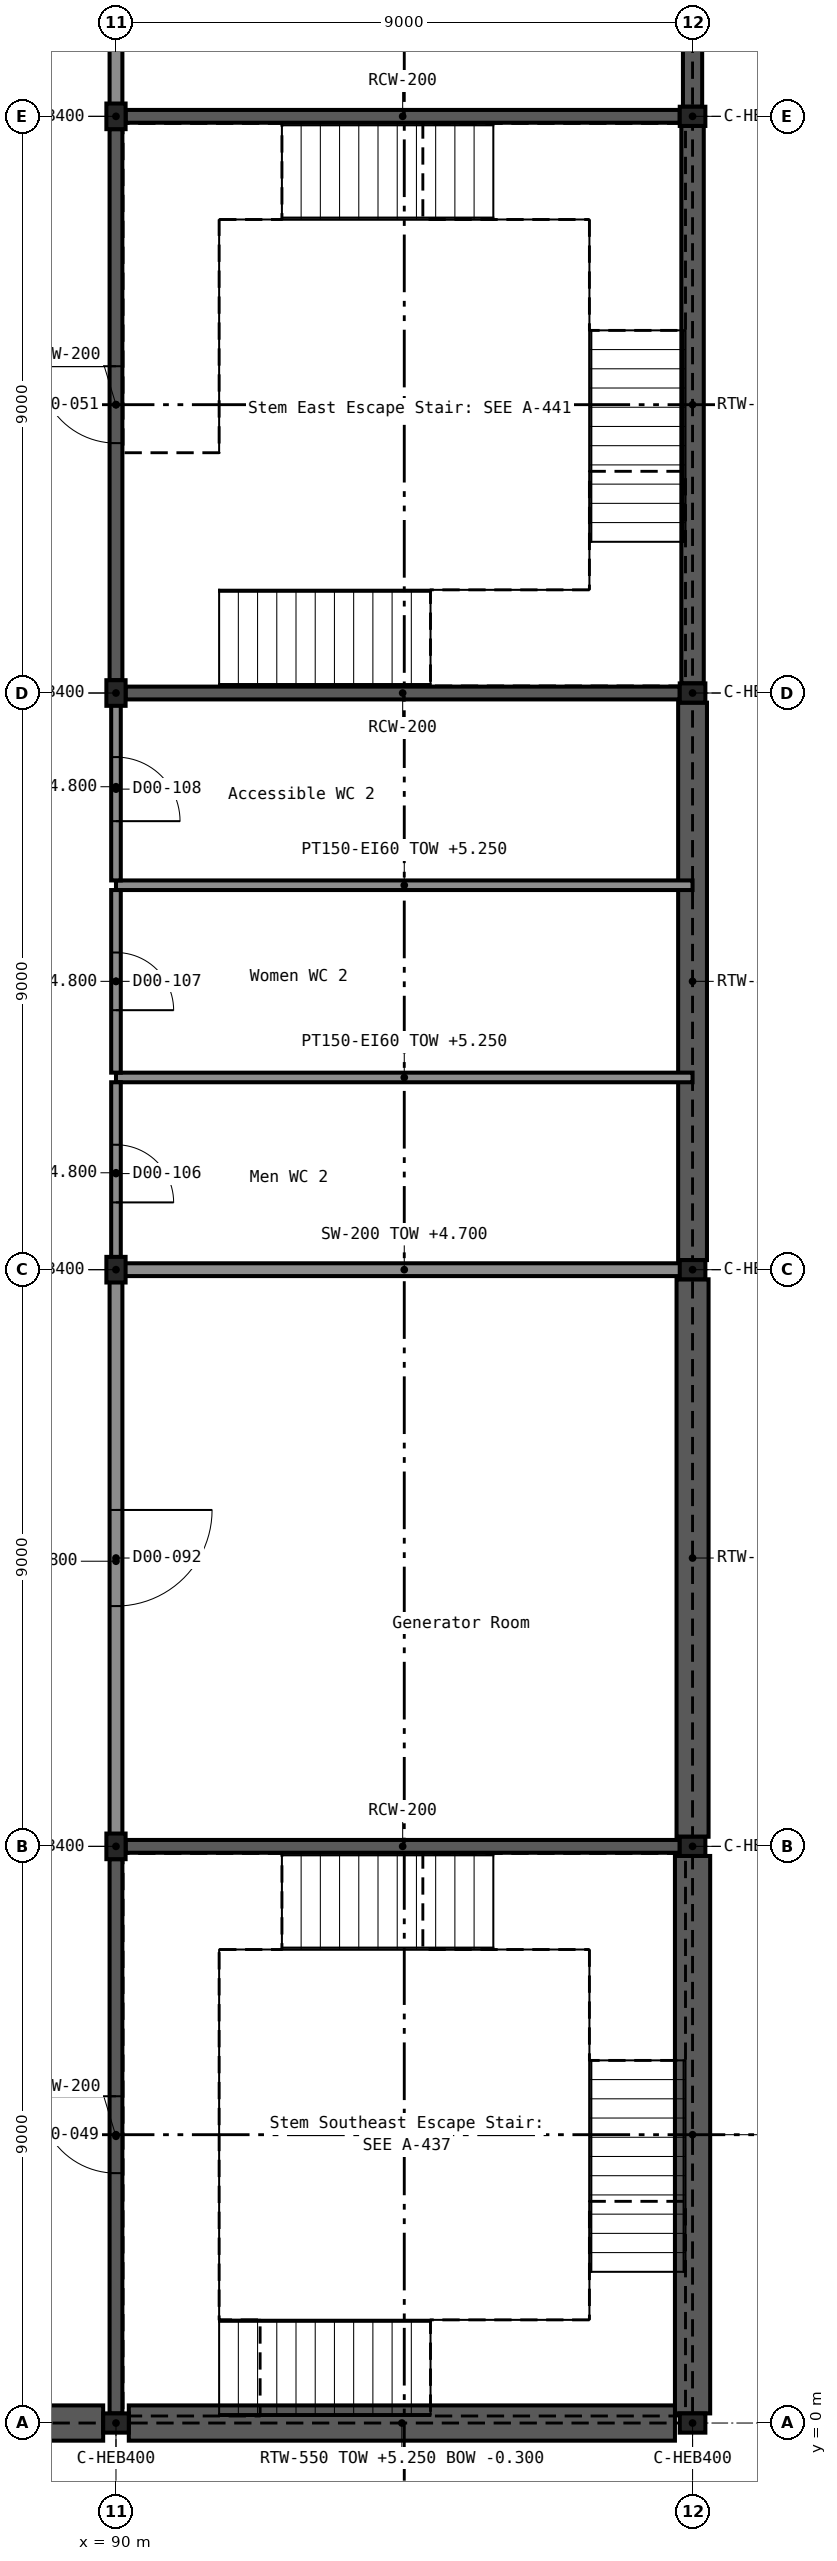
"""IFC4 building model, lengths in metres.
Left out: names, types, materials, properties, quantities, classifications, styles, units other than length and angle.
Written with IfcOpenShell. Run it as: python <this file> out.ifc"""

import sys

from ifc_helpers import new_model, si_unit, direction, frame, frame_2d, origin, origin_2d, place, context, subcontext, project, spatial, rectangle, i_section, extrude, element, fill, save


model = new_model("IFC4")
c1 = context("Model", 3, precision=1e-05, world=origin(), true_north=direction((0.0, 1.0)))
c2 = subcontext(c1, "Body", "Model", "MODEL_VIEW")
j1 = project(units=[si_unit("LENGTHUNIT", "METRE"), si_unit("PLANEANGLEUNIT", "RADIAN")], contexts=[c1])
p1 = place(None, origin())
s1 = spatial("IfcSite", under=j1, at=p1, CompositionType="ELEMENT")
p2 = place(p1, origin())
s2 = spatial("IfcBuilding", under=s1, at=p2, CompositionType="ELEMENT")
p3 = place(p2, origin())
s3 = spatial("IfcBuildingStorey", under=s2, at=p3, CompositionType="ELEMENT", Elevation=0.0)
for number, where, z_axis, x_axis in (
    (1, (90.0, 0.0, -0.3), (0.0, 0.0, 1.0), (0.0, 1.0, 0.0)),
    (2, (99.0, 0.0, -0.3), (0.0, 0.0, 1.0), (0.0, 1.0, 0.0)),
    (3, (90.0, 9.0, -0.3), (0.0, 0.0, 1.0), (1.0, 0.0, 0.0)),
    (4, (99.0, 9.0, -0.3), (0.0, 0.0, 1.0), (0.0, 1.0, 0.0)),
    (5, (90.0, 18.0, -0.3), (0.0, 0.0, 1.0), (1.0, 0.0, 0.0)),
    (6, (99.0, 18.0, -0.3), (0.0, 0.0, 1.0), (0.0, 1.0, 0.0)),
    (7, (90.0, 27.0, -0.3), (0.0, 0.0, 1.0), (1.0, 0.0, 0.0)),
    (8, (99.0, 27.0, -0.3), (0.0, 0.0, 1.0), (0.0, 1.0, 0.0)),
    (9, (90.0, 36.0, -0.3), (0.0, 0.0, 1.0), (1.0, 0.0, 0.0)),
    (10, (99.0, 36.0, -0.3), (0.0, 0.0, 1.0), (0.0, 1.0, 0.0)),
):
    element("IfcColumn", number, at=place(p3, frame(where, z_axis=z_axis, x_axis=x_axis)), inside=s3, PredefinedType="COLUMN", context=c2, shape_type="SweptSolid", body=[
        extrude(i_section(OverallWidth=0.3, OverallDepth=0.4, WebThickness=0.013, FlangeThickness=0.024, FilletRadius=0.027, at=origin_2d()), origin(), (0.0, 0.0, 1.0), 5.7),
    ])
p4 = place(p3, frame((99.0, 0.15, -0.3), z_axis=(0.0, 0.0, 1.0), x_axis=(0.0, 1.0, 0.0)))
e11 = element("IfcWall", 11, at=p4, inside=s3, PredefinedType="SOLIDWALL", context=c2, shape_type="SweptSolid", body=[
    extrude(rectangle(XDim=8.7, YDim=0.55, at=frame_2d((4.35, 0.0))), origin(), (0.0, 0.0, 1.0), 5.55),
])
p5 = place(p3, frame((99.0, 9.15, -0.3), z_axis=(0.0, 0.0, 1.0), x_axis=(0.0, 1.0, 0.0)))
e12 = element("IfcWall", 12, at=p5, inside=s3, PredefinedType="SOLIDWALL", context=c2, shape_type="SweptSolid", body=[
    extrude(rectangle(XDim=8.7, YDim=0.5, at=frame_2d((4.35, 0.0))), origin(), (0.0, 0.0, 1.0), 5.55),
])
p6 = place(p3, frame((99.0, 18.15, -0.3), z_axis=(0.0, 0.0, 1.0), x_axis=(0.0, 1.0, 0.0)))
e13 = element("IfcWall", 13, at=p6, inside=s3, PredefinedType="SOLIDWALL", context=c2, shape_type="SweptSolid", body=[
    extrude(rectangle(XDim=8.7, YDim=0.45, at=frame_2d((4.35, 0.0))), origin(), (0.0, 0.0, 1.0), 5.55),
])
p7 = place(p3, frame((99.0, 27.15, -0.3), z_axis=(0.0, 0.0, 1.0), x_axis=(0.0, 1.0, 0.0)))
e14 = element("IfcWall", 14, at=p7, inside=s3, PredefinedType="SOLIDWALL", context=c2, shape_type="SweptSolid", body=[
    extrude(rectangle(XDim=8.7, YDim=0.35, at=frame_2d((4.35, 0.0))), origin(), (0.0, 0.0, 1.0), 5.55),
])
p8 = place(p3, frame((99.0, 36.15, -0.3), z_axis=(0.0, 0.0, 1.0), x_axis=(0.0, 1.0, 0.0)))
e15 = element("IfcWall", 15, at=p8, inside=s3, PredefinedType="SOLIDWALL", context=c2, shape_type="SweptSolid", body=[
    extrude(rectangle(XDim=8.7, YDim=0.3, at=frame_2d((4.35, 0.0))), origin(), (0.0, 0.0, 1.0), 5.55),
])
p9 = place(p3, frame((81.2, 0.0, -0.3), z_axis=(0.0, 0.0, 1.0), x_axis=(1.0, 0.0, 0.0)))
e16 = element("IfcWall", 16, at=p9, inside=s3, PredefinedType="SOLIDWALL", context=c2, shape_type="SweptSolid", body=[
    extrude(rectangle(XDim=8.6, YDim=0.55, at=frame_2d((4.3, 0.0))), origin(), (0.0, 0.0, 1.0), 5.55),
])
p10 = place(p3, frame((90.2, 0.0, -0.3), z_axis=(0.0, 0.0, 1.0), x_axis=(1.0, 0.0, 0.0)))
e17 = element("IfcWall", 17, at=p10, inside=s3, PredefinedType="SOLIDWALL", context=c2, shape_type="SweptSolid", body=[
    extrude(rectangle(XDim=8.525, YDim=0.55, at=frame_2d((4.263, 0.0))), origin(), (0.0, 0.0, 1.0), 5.55),
])
p11 = place(p3, frame((90.15, 9.0, 0.0), z_axis=(0.0, 0.0, 1.0), x_axis=(1.0, 0.0, 0.0)))
e18 = element("IfcWall", 18, at=p11, inside=s3, PredefinedType="SHEAR", context=c2, shape_type="SweptSolid", body=[
    extrude(rectangle(XDim=8.65, YDim=0.2, at=frame_2d((4.325, 0.0))), origin(), (0.0, 0.0, 1.0), 5.4),
])
p12 = place(p3, frame((90.0, 0.15, 0.0), z_axis=(0.0, 0.0, 1.0), x_axis=(0.0, 1.0, 0.0)))
e19 = element("IfcWall", 19, at=p12, inside=s3, PredefinedType="SHEAR", context=c2, shape_type="SweptSolid", body=[
    extrude(rectangle(XDim=8.65, YDim=0.2, at=frame_2d((4.325, 0.0))), origin(), (0.0, 0.0, 1.0), 5.4),
])
p13 = place(p12, frame((3.75, 0.0, 0.0)))
e20 = element("IfcOpeningElement", 20, at=p13, cuts=e19, PredefinedType="OPENING", context=c2, shape_type="SweptSolid", body=[
    extrude(rectangle(XDim=1.2, YDim=2.1, at=frame_2d((0.6, 1.05))), frame((0.0, 0.111, 0.0), z_axis=(0.0, -1.0, 0.0), x_axis=(1.0, 0.0, 0.0)), (0.0, 0.0, 1.0), 0.222),
])
for number, where, z_axis, x_axis in (
    (21, (90.15, 27.0, 0.0), (0.0, 0.0, 1.0), (1.0, 0.0, 0.0)),
    (22, (90.15, 36.0, 0.0), (0.0, 0.0, 1.0), (1.0, 0.0, 0.0)),
):
    element("IfcWall", number, at=place(p3, frame(where, z_axis=z_axis, x_axis=x_axis)), inside=s3, PredefinedType="SHEAR", context=c2, shape_type="SweptSolid", body=[
        extrude(rectangle(XDim=8.65, YDim=0.2, at=frame_2d((4.325, 0.0))), origin(), (0.0, 0.0, 1.0), 5.4),
    ])
p14 = place(p3, frame((90.0, 27.2, 0.0), z_axis=(0.0, 0.0, 1.0), x_axis=(0.0, 1.0, 0.0)))
e23 = element("IfcWall", 23, at=p14, inside=s3, PredefinedType="SHEAR", context=c2, shape_type="SweptSolid", body=[
    extrude(rectangle(XDim=8.6, YDim=0.2, at=frame_2d((4.3, 0.0))), origin(), (0.0, 0.0, 1.0), 5.4),
])
p15 = place(p14, frame((3.7, 0.0, 0.0)))
e24 = element("IfcOpeningElement", 24, at=p15, cuts=e23, PredefinedType="OPENING", context=c2, shape_type="SweptSolid", body=[
    extrude(rectangle(XDim=1.2, YDim=2.1, at=frame_2d((0.6, 1.05))), frame((0.0, 0.111, 0.0), z_axis=(0.0, -1.0, 0.0), x_axis=(1.0, 0.0, 0.0)), (0.0, 0.0, 1.0), 0.222),
])
p16 = place(p3, frame((90.0, 18.0, 0.0), z_axis=(0.0, 0.0, 1.0), x_axis=(1.0, 0.0, 0.0)))
e25 = element("IfcWall", 25, at=p16, inside=s3, PredefinedType="SOLIDWALL", context=c2, shape_type="SweptSolid", body=[
    extrude(rectangle(XDim=9.0, YDim=0.2, at=frame_2d((4.5, 0.0))), origin(), (0.0, 0.0, 1.0), 4.7),
])
p17 = place(p3, frame((90.0, 9.0, 0.0), z_axis=(0.0, 0.0, 1.0), x_axis=(0.0, 1.0, 0.0)))
e26 = element("IfcWall", 26, at=p17, inside=s3, PredefinedType="SOLIDWALL", context=c2, shape_type="SweptSolid", body=[
    extrude(rectangle(XDim=8.9, YDim=0.2, at=frame_2d((4.45, 0.0))), origin(), (0.0, 0.0, 1.0), 4.8),
])
p18 = place(p17, frame((3.75, 0.0, 0.0)))
e27 = element("IfcOpeningElement", 27, at=p18, cuts=e26, PredefinedType="OPENING", context=c2, shape_type="SweptSolid", body=[
    extrude(rectangle(XDim=1.5, YDim=3.0, at=frame_2d((0.75, 1.5))), frame((0.0, 0.111, 0.0), z_axis=(0.0, -1.0, 0.0), x_axis=(1.0, 0.0, 0.0)), (0.0, 0.0, 1.0), 0.222),
])
p19 = place(p3, frame((90.0, 36.0, 0.0), z_axis=(0.0, 0.0, 1.0), x_axis=(0.0, 1.0, 0.0)))
e28 = element("IfcWall", 28, at=p19, inside=s3, PredefinedType="SOLIDWALL", context=c2, shape_type="SweptSolid", body=[
    extrude(rectangle(XDim=9.0, YDim=0.2, at=frame_2d((4.5, 0.0))), origin(), (0.0, 0.0, 1.0), 4.8),
])
p20 = place(p19, frame((3.75, 0.0, 0.0)))
e29 = element("IfcOpeningElement", 29, at=p20, cuts=e28, PredefinedType="OPENING", context=c2, shape_type="SweptSolid", body=[
    extrude(rectangle(XDim=1.5, YDim=2.4, at=frame_2d((0.75, 1.2))), frame((0.0, 0.111, 0.0), z_axis=(0.0, -1.0, 0.0), x_axis=(1.0, 0.0, 0.0)), (0.0, 0.0, 1.0), 0.222),
])
for number, where, z_axis, x_axis in (
    (30, (90.0, 21.0, 0.0), (0.0, 0.0, 1.0), (1.0, 0.0, 0.0)),
    (31, (90.0, 24.0, 0.0), (0.0, 0.0, 1.0), (1.0, 0.0, 0.0)),
):
    element("IfcWall", number, at=place(p3, frame(where, z_axis=z_axis, x_axis=x_axis)), inside=s3, PredefinedType="PARTITIONING", context=c2, shape_type="SweptSolid", body=[
        extrude(rectangle(XDim=9.0, YDim=0.15, at=frame_2d((4.5, 0.0))), origin(), (0.0, 0.0, 1.0), 5.25),
    ])
p21 = place(p3, frame((90.0, 18.1, 0.0), z_axis=(0.0, 0.0, 1.0), x_axis=(0.0, 1.0, 0.0)))
e32 = element("IfcWall", 32, at=p21, inside=s3, PredefinedType="PARTITIONING", context=c2, shape_type="SweptSolid", body=[
    extrude(rectangle(XDim=2.825, YDim=0.15, at=frame_2d((1.413, 0.0))), origin(), (0.0, 0.0, 1.0), 4.8),
])
p22 = place(p21, frame((0.95, 0.0, 0.0)))
e33 = element("IfcOpeningElement", 33, at=p22, cuts=e32, PredefinedType="OPENING", context=c2, shape_type="SweptSolid", body=[
    extrude(rectangle(XDim=0.9, YDim=2.1, at=frame_2d((0.45, 1.05))), frame((0.0, 0.086, 0.0), z_axis=(0.0, -1.0, 0.0), x_axis=(1.0, 0.0, 0.0)), (0.0, 0.0, 1.0), 0.172),
])
p23 = place(p3, frame((90.0, 21.075, 0.0), z_axis=(0.0, 0.0, 1.0), x_axis=(0.0, 1.0, 0.0)))
e34 = element("IfcWall", 34, at=p23, inside=s3, PredefinedType="PARTITIONING", context=c2, shape_type="SweptSolid", body=[
    extrude(rectangle(XDim=2.85, YDim=0.15, at=frame_2d((1.425, 0.0))), origin(), (0.0, 0.0, 1.0), 4.8),
])
p24 = place(p23, frame((0.975, 0.0, 0.0)))
e35 = element("IfcOpeningElement", 35, at=p24, cuts=e34, PredefinedType="OPENING", context=c2, shape_type="SweptSolid", body=[
    extrude(rectangle(XDim=0.9, YDim=2.1, at=frame_2d((0.45, 1.05))), frame((0.0, 0.086, 0.0), z_axis=(0.0, -1.0, 0.0), x_axis=(1.0, 0.0, 0.0)), (0.0, 0.0, 1.0), 0.172),
])
p25 = place(p3, frame((90.0, 24.075, 0.0), z_axis=(0.0, 0.0, 1.0), x_axis=(0.0, 1.0, 0.0)))
e36 = element("IfcWall", 36, at=p25, inside=s3, PredefinedType="PARTITIONING", context=c2, shape_type="SweptSolid", body=[
    extrude(rectangle(XDim=2.925, YDim=0.15, at=frame_2d((1.462, 0.0))), origin(), (0.0, 0.0, 1.0), 4.8),
])
p26 = place(p25, frame((0.925, 0.0, 0.0)))
e37 = element("IfcOpeningElement", 37, at=p26, cuts=e36, PredefinedType="OPENING", context=c2, shape_type="SweptSolid", body=[
    extrude(rectangle(XDim=1.0, YDim=2.1, at=frame_2d((0.5, 1.05))), frame((0.0, 0.086, 0.0), z_axis=(0.0, -1.0, 0.0), x_axis=(1.0, 0.0, 0.0)), (0.0, 0.0, 1.0), 0.172),
])
p27 = place(p13, origin())
e38 = element("IfcDoor", 38, at=p27, inside=s3, OperationType="SINGLE_SWING_RIGHT", PredefinedType="DOOR", context=c2, shape_type="SweptSolid", body=[
    extrude(rectangle(XDim=1.2, YDim=2.1, at=frame_2d((0.6, 1.05))), frame((0.0, 0.025, 0.0), z_axis=(0.0, -1.0, 0.0), x_axis=(1.0, 0.0, 0.0)), (0.0, 0.0, 1.0), 0.05),
])
fill(e20, e38)
p28 = place(p15, origin())
e39 = element("IfcDoor", 39, at=p28, inside=s3, OperationType="SINGLE_SWING_RIGHT", PredefinedType="DOOR", context=c2, shape_type="SweptSolid", body=[
    extrude(rectangle(XDim=1.2, YDim=2.1, at=frame_2d((0.6, 1.05))), frame((0.0, 0.025, 0.0), z_axis=(0.0, -1.0, 0.0), x_axis=(1.0, 0.0, 0.0)), (0.0, 0.0, 1.0), 0.05),
])
fill(e24, e39)
p29 = place(p18, frame((1.5, 0.0, 0.0), z_axis=(0.0, 0.0, 1.0), x_axis=(-1.0, 0.0, 0.0)))
e40 = element("IfcDoor", 40, at=p29, inside=s3, OperationType="DOUBLE_DOOR_SINGLE_SWING", PredefinedType="DOOR", context=c2, shape_type="SweptSolid", body=[
    extrude(rectangle(XDim=1.5, YDim=3.0, at=frame_2d((0.75, 1.5))), frame((0.0, 0.025, 0.0), z_axis=(0.0, -1.0, 0.0), x_axis=(1.0, 0.0, 0.0)), (0.0, 0.0, 1.0), 0.05),
])
fill(e27, e40)
p30 = place(p22, frame((0.9, 0.0, 0.0), z_axis=(0.0, 0.0, 1.0), x_axis=(-1.0, 0.0, 0.0)))
e41 = element("IfcDoor", 41, at=p30, inside=s3, OperationType="SINGLE_SWING_RIGHT", PredefinedType="DOOR", context=c2, shape_type="SweptSolid", body=[
    extrude(rectangle(XDim=0.9, YDim=2.1, at=frame_2d((0.45, 1.05))), frame((0.0, 0.025, 0.0), z_axis=(0.0, -1.0, 0.0), x_axis=(1.0, 0.0, 0.0)), (0.0, 0.0, 1.0), 0.05),
])
fill(e33, e41)
p31 = place(p24, frame((0.9, 0.0, 0.0), z_axis=(0.0, 0.0, 1.0), x_axis=(-1.0, 0.0, 0.0)))
e42 = element("IfcDoor", 42, at=p31, inside=s3, OperationType="SINGLE_SWING_RIGHT", PredefinedType="DOOR", context=c2, shape_type="SweptSolid", body=[
    extrude(rectangle(XDim=0.9, YDim=2.1, at=frame_2d((0.45, 1.05))), frame((0.0, 0.025, 0.0), z_axis=(0.0, -1.0, 0.0), x_axis=(1.0, 0.0, 0.0)), (0.0, 0.0, 1.0), 0.05),
])
fill(e35, e42)
p32 = place(p26, frame((1.0, 0.0, 0.0), z_axis=(0.0, 0.0, 1.0), x_axis=(-1.0, 0.0, 0.0)))
e43 = element("IfcDoor", 43, at=p32, inside=s3, OperationType="SINGLE_SWING_RIGHT", PredefinedType="DOOR", context=c2, shape_type="SweptSolid", body=[
    extrude(rectangle(XDim=1.0, YDim=2.1, at=frame_2d((0.5, 1.05))), frame((0.0, 0.025, 0.0), z_axis=(0.0, -1.0, 0.0), x_axis=(1.0, 0.0, 0.0)), (0.0, 0.0, 1.0), 0.05),
])
fill(e37, e43)
save(model, sys.argv[1])
